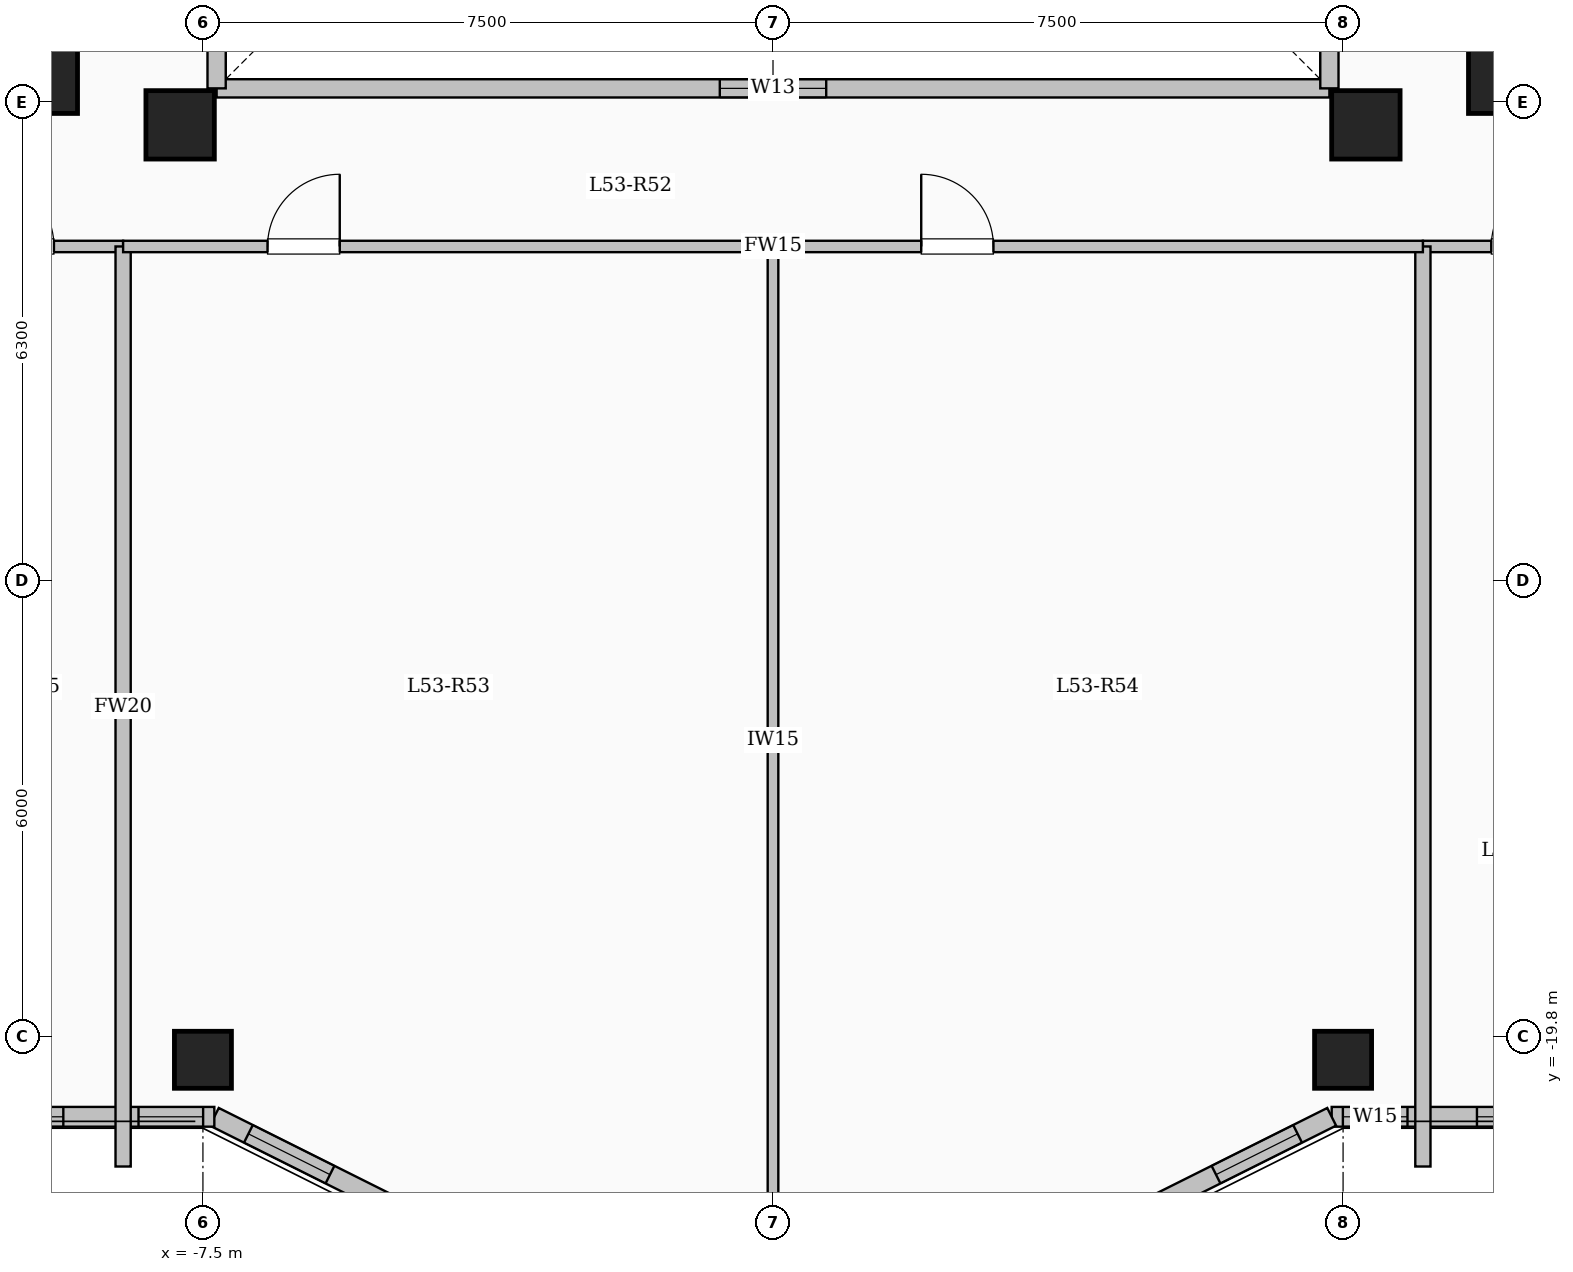
"""IFC4 building model, lengths in metres.
Left out: names, types, materials, properties, quantities, classifications, styles, units other than length and angle.
Written with IfcOpenShell. Run it as: python <this file> out.ifc"""

import sys

from ifc_helpers import new_model, si_unit, direction, frame, frame_2d, origin, origin_2d, place, context, subcontext, project, spatial, rectangle, extrude, element, fill, save


model = new_model("IFC4")
c1 = context("Model", 3, precision=1e-05, world=origin(), true_north=direction((0.0, 1.0)))
c2 = subcontext(c1, "Body", "Model", "MODEL_VIEW")
j1 = project(units=[si_unit("LENGTHUNIT", "METRE"), si_unit("PLANEANGLEUNIT", "RADIAN")], contexts=[c1])
p1 = place(None, origin())
s1 = spatial("IfcSite", under=j1, at=p1, CompositionType="ELEMENT")
p2 = place(p1, origin())
s2 = spatial("IfcBuilding", under=s1, at=p2, CompositionType="ELEMENT")
p3 = place(p2, frame((0.0, 0.0, 196.95)))
s3 = spatial("IfcBuildingStorey", under=s2, at=p3, CompositionType="ELEMENT", Elevation=196.95)
for number, where, z_axis, x_axis in (
    (1, (-7.8, -7.8, 0.0), (0.0, 0.0, 1.0), (1.0, 0.0, 0.0)),
    (2, (7.8, -7.8, 0.0), (0.0, 0.0, 1.0), (1.0, 0.0, 0.0)),
    (3, (-9.6, -7.2, 0.0), (0.0, 0.0, 1.0), (1.0, 0.0, 0.0)),
    (4, (9.6, -7.2, 0.0), (0.0, 0.0, 1.0), (1.0, 0.0, 0.0)),
):
    element("IfcColumn", number, at=place(p3, frame(where, z_axis=z_axis, x_axis=x_axis)), inside=s3, PredefinedType="COLUMN", context=c2, shape_type="SweptSolid", body=[
        extrude(rectangle(XDim=0.9, YDim=0.9, at=origin_2d()), origin(), (0.0, 0.0, 1.0), 3.35),
    ])
for number, where, z_axis, x_axis in (
    (5, (-7.5, -20.1, 0.0), (0.0, 0.0, 1.0), (1.0, 0.0, 0.0)),
    (6, (7.5, -20.1, 0.0), (0.0, 0.0, 1.0), (1.0, 0.0, 0.0)),
):
    element("IfcColumn", number, at=place(p3, frame(where, z_axis=z_axis, x_axis=x_axis)), inside=s3, PredefinedType="COLUMN", context=c2, shape_type="SweptSolid", body=[
        extrude(rectangle(XDim=0.75, YDim=0.75, at=origin_2d()), origin(), (0.0, 0.0, 1.0), 3.35),
    ])
p4 = place(p3, frame((-7.32, -7.32, 0.0), z_axis=(0.0, 0.0, 1.0), x_axis=(1.0, 0.0, 0.0)))
e7 = element("IfcWall", 7, at=p4, inside=s3, PredefinedType="SOLIDWALL", context=c2, shape_type="SweptSolid", body=[
    extrude(rectangle(XDim=14.64, YDim=0.24, at=frame_2d((7.32, 0.0))), origin(), (0.0, 0.0, 1.0), 3.1),
])
p5 = place(p4, frame((6.62, 0.0, 0.95)))
e8 = element("IfcOpeningElement", 8, at=p5, cuts=e7, PredefinedType="OPENING", context=c2, shape_type="SweptSolid", body=[
    extrude(rectangle(XDim=1.4, YDim=1.5, at=frame_2d((0.7, 0.75))), frame((0.0, 0.13, 0.0), z_axis=(0.0, -1.0, 0.0), x_axis=(1.0, 0.0, 0.0)), (0.0, 0.0, 1.0), 0.26),
])
p6 = place(p3, frame((7.32, -7.32, 0.0), z_axis=(0.0, 0.0, 1.0), x_axis=(0.0, 1.0, 0.0)))
e9 = element("IfcWall", 9, at=p6, inside=s3, PredefinedType="SOLIDWALL", context=c2, shape_type="SweptSolid", body=[
    extrude(rectangle(XDim=14.64, YDim=0.24, at=frame_2d((7.32, 0.0))), origin(), (0.0, 0.0, 1.0), 3.1),
])
p7 = place(p6, frame((6.62, 0.0, 0.95)))
e10 = element("IfcOpeningElement", 10, at=p7, cuts=e9, PredefinedType="OPENING", context=c2, shape_type="SweptSolid", body=[
    extrude(rectangle(XDim=1.4, YDim=1.5, at=frame_2d((0.7, 0.75))), frame((0.0, 0.13, 0.0), z_axis=(0.0, -1.0, 0.0), x_axis=(1.0, 0.0, 0.0)), (0.0, 0.0, 1.0), 0.26),
])
p8 = place(p3, frame((-7.32, 7.32, 0.0), z_axis=(0.0, 0.0, 1.0), x_axis=(0.0, -1.0, 0.0)))
e11 = element("IfcWall", 11, at=p8, inside=s3, PredefinedType="SOLIDWALL", context=c2, shape_type="SweptSolid", body=[
    extrude(rectangle(XDim=14.64, YDim=0.24, at=frame_2d((7.32, 0.0))), origin(), (0.0, 0.0, 1.0), 3.1),
])
p9 = place(p8, frame((6.62, 0.0, 0.95)))
e12 = element("IfcOpeningElement", 12, at=p9, cuts=e11, PredefinedType="OPENING", context=c2, shape_type="SweptSolid", body=[
    extrude(rectangle(XDim=1.4, YDim=1.5, at=frame_2d((0.7, 0.75))), frame((0.0, 0.13, 0.0), z_axis=(0.0, -1.0, 0.0), x_axis=(1.0, 0.0, 0.0)), (0.0, 0.0, 1.0), 0.26),
])
p10 = place(p3, frame((18.45, -20.85, 0.0), z_axis=(0.0, 0.0, 1.0), x_axis=(-1.0, 0.0, 0.0)))
e13 = element("IfcWall", 13, at=p10, inside=s3, PredefinedType="SOLIDWALL", context=c2, shape_type="SweptSolid", body=[
    extrude(rectangle(XDim=11.1, YDim=0.26, at=frame_2d((5.55, 0.0))), origin(), (0.0, 0.0, 1.0), 3.1),
])
p11 = place(p10, frame((0.656, 0.0, 0.95)))
e14 = element("IfcOpeningElement", 14, at=p11, cuts=e13, PredefinedType="OPENING", context=c2, shape_type="SweptSolid", body=[
    extrude(rectangle(XDim=1.2, YDim=1.5, at=frame_2d((0.6, 0.75))), frame((0.0, 0.14, 0.0), z_axis=(0.0, -1.0, 0.0), x_axis=(1.0, 0.0, 0.0)), (0.0, 0.0, 1.0), 0.28),
])
p12 = place(p10, frame((3.117, 0.0, 0.95)))
e15 = element("IfcOpeningElement", 15, at=p12, cuts=e13, PredefinedType="OPENING", context=c2, shape_type="SweptSolid", body=[
    extrude(rectangle(XDim=1.2, YDim=1.5, at=frame_2d((0.6, 0.75))), frame((0.0, 0.14, 0.0), z_axis=(0.0, -1.0, 0.0), x_axis=(1.0, 0.0, 0.0)), (0.0, 0.0, 1.0), 0.28),
])
p13 = place(p10, frame((5.566, 0.0, 0.95)))
e16 = element("IfcOpeningElement", 16, at=p13, cuts=e13, PredefinedType="OPENING", context=c2, shape_type="SweptSolid", body=[
    extrude(rectangle(XDim=1.2, YDim=1.5, at=frame_2d((0.6, 0.75))), frame((0.0, 0.14, 0.0), z_axis=(0.0, -1.0, 0.0), x_axis=(1.0, 0.0, 0.0)), (0.0, 0.0, 1.0), 0.28),
])
p14 = place(p10, frame((7.989, 0.0, 0.95)))
e17 = element("IfcOpeningElement", 17, at=p14, cuts=e13, PredefinedType="OPENING", context=c2, shape_type="SweptSolid", body=[
    extrude(rectangle(XDim=1.2, YDim=1.5, at=frame_2d((0.6, 0.75))), frame((0.0, 0.14, 0.0), z_axis=(0.0, -1.0, 0.0), x_axis=(1.0, 0.0, 0.0)), (0.0, 0.0, 1.0), 0.28),
])
p15 = place(p10, frame((10.103, 0.0, 0.95)))
e18 = element("IfcOpeningElement", 18, at=p15, cuts=e13, PredefinedType="OPENING", context=c2, shape_type="SweptSolid", body=[
    extrude(rectangle(XDim=0.85, YDim=1.5, at=frame_2d((0.425, 0.75))), frame((0.0, 0.14, 0.0), z_axis=(0.0, -1.0, 0.0), x_axis=(1.0, 0.0, 0.0)), (0.0, 0.0, 1.0), 0.28),
])
p16 = place(p3, frame((7.35, -20.85, 0.0), z_axis=(0.0, 0.0, 1.0), x_axis=(-0.894427191, -0.4472135955, 0.0)))
e19 = element("IfcWall", 19, at=p16, inside=s3, PredefinedType="SOLIDWALL", context=c2, shape_type="SweptSolid", body=[
    extrude(rectangle(XDim=3.354, YDim=0.26, at=frame_2d((1.677, 0.0))), origin(), (0.0, 0.0, 1.0), 3.1),
])
p17 = place(p16, frame((0.501, 0.0, 0.95)))
e20 = element("IfcOpeningElement", 20, at=p17, cuts=e19, PredefinedType="OPENING", context=c2, shape_type="SweptSolid", body=[
    extrude(rectangle(XDim=1.2, YDim=1.5, at=frame_2d((0.6, 0.75))), frame((0.0, 0.14, 0.0), z_axis=(0.0, -1.0, 0.0), x_axis=(1.0, 0.0, 0.0)), (0.0, 0.0, 1.0), 0.28),
])
p18 = place(p3, frame((-4.35, -22.35, 0.0), z_axis=(0.0, 0.0, 1.0), x_axis=(-0.894427191, 0.4472135955, 0.0)))
e21 = element("IfcWall", 21, at=p18, inside=s3, PredefinedType="SOLIDWALL", context=c2, shape_type="SweptSolid", body=[
    extrude(rectangle(XDim=3.354, YDim=0.26, at=frame_2d((1.677, 0.0))), origin(), (0.0, 0.0, 1.0), 3.1),
])
p19 = place(p18, frame((1.653, 0.0, 0.95)))
e22 = element("IfcOpeningElement", 22, at=p19, cuts=e21, PredefinedType="OPENING", context=c2, shape_type="SweptSolid", body=[
    extrude(rectangle(XDim=1.2, YDim=1.5, at=frame_2d((0.6, 0.75))), frame((0.0, 0.14, 0.0), z_axis=(0.0, -1.0, 0.0), x_axis=(1.0, 0.0, 0.0)), (0.0, 0.0, 1.0), 0.28),
])
p20 = place(p3, frame((-7.35, -20.85, 0.0), z_axis=(0.0, 0.0, 1.0), x_axis=(-1.0, 0.0, 0.0)))
e23 = element("IfcWall", 23, at=p20, inside=s3, PredefinedType="SOLIDWALL", context=c2, shape_type="SweptSolid", body=[
    extrude(rectangle(XDim=11.1, YDim=0.26, at=frame_2d((5.55, 0.0))), origin(), (0.0, 0.0, 1.0), 3.1),
])
p21 = place(p20, frame((0.147, 0.0, 0.95)))
e24 = element("IfcOpeningElement", 24, at=p21, cuts=e23, PredefinedType="OPENING", context=c2, shape_type="SweptSolid", body=[
    extrude(rectangle(XDim=0.85, YDim=1.5, at=frame_2d((0.425, 0.75))), frame((0.0, 0.14, 0.0), z_axis=(0.0, -1.0, 0.0), x_axis=(1.0, 0.0, 0.0)), (0.0, 0.0, 1.0), 0.28),
])
p22 = place(p20, frame((1.987, 0.0, 0.95)))
e25 = element("IfcOpeningElement", 25, at=p22, cuts=e23, PredefinedType="OPENING", context=c2, shape_type="SweptSolid", body=[
    extrude(rectangle(XDim=1.2, YDim=1.5, at=frame_2d((0.6, 0.75))), frame((0.0, 0.14, 0.0), z_axis=(0.0, -1.0, 0.0), x_axis=(1.0, 0.0, 0.0)), (0.0, 0.0, 1.0), 0.28),
])
p23 = place(p20, frame((4.926, 0.0, 0.9)))
e26 = element("IfcOpeningElement", 26, at=p23, cuts=e23, PredefinedType="OPENING", context=c2, shape_type="SweptSolid", body=[
    extrude(rectangle(XDim=1.65, YDim=1.6, at=frame_2d((0.825, 0.8))), frame((0.0, 0.14, 0.0), z_axis=(0.0, -1.0, 0.0), x_axis=(1.0, 0.0, 0.0)), (0.0, 0.0, 1.0), 0.28),
])
p24 = place(p20, frame((8.467, 0.0, 0.9)))
e27 = element("IfcOpeningElement", 27, at=p24, cuts=e23, PredefinedType="OPENING", context=c2, shape_type="SweptSolid", body=[
    extrude(rectangle(XDim=1.65, YDim=1.6, at=frame_2d((0.825, 0.8))), frame((0.0, 0.14, 0.0), z_axis=(0.0, -1.0, 0.0), x_axis=(1.0, 0.0, 0.0)), (0.0, 0.0, 1.0), 0.28),
])
p25 = place(p3, frame((-18.35, -9.4, 0.0), z_axis=(0.0, 0.0, 1.0), x_axis=(1.0, 0.0, 0.0)))
e28 = element("IfcWall", 28, at=p25, inside=s3, PredefinedType="PARTITIONING", context=c2, shape_type="SweptSolid", body=[
    extrude(rectangle(XDim=9.8, YDim=0.15, at=frame_2d((4.9, 0.0))), origin(), (0.0, 0.0, 1.0), 3.1),
])
p26 = place(p25, frame((1.25, 0.0, 0.0)))
e29 = element("IfcOpeningElement", 29, at=p26, cuts=e28, PredefinedType="OPENING", context=c2, shape_type="SweptSolid", body=[
    extrude(rectangle(XDim=0.95, YDim=2.15, at=frame_2d((0.475, 1.075))), frame((0.0, 0.085, 0.0), z_axis=(0.0, -1.0, 0.0), x_axis=(1.0, 0.0, 0.0)), (0.0, 0.0, 1.0), 0.17),
])
p27 = place(p25, frame((4.79, 0.0, 0.0)))
e30 = element("IfcOpeningElement", 30, at=p27, cuts=e28, PredefinedType="OPENING", context=c2, shape_type="SweptSolid", body=[
    extrude(rectangle(XDim=0.95, YDim=2.15, at=frame_2d((0.475, 1.075))), frame((0.0, 0.085, 0.0), z_axis=(0.0, -1.0, 0.0), x_axis=(1.0, 0.0, 0.0)), (0.0, 0.0, 1.0), 0.17),
])
p28 = place(p25, frame((7.94, 0.0, 0.0)))
e31 = element("IfcOpeningElement", 31, at=p28, cuts=e28, PredefinedType="OPENING", context=c2, shape_type="SweptSolid", body=[
    extrude(rectangle(XDim=0.95, YDim=2.15, at=frame_2d((0.475, 1.075))), frame((0.0, 0.085, 0.0), z_axis=(0.0, -1.0, 0.0), x_axis=(1.0, 0.0, 0.0)), (0.0, 0.0, 1.0), 0.17),
])
p29 = place(p3, frame((8.55, -9.4, 0.0), z_axis=(0.0, 0.0, 1.0), x_axis=(1.0, 0.0, 0.0)))
e32 = element("IfcWall", 32, at=p29, inside=s3, PredefinedType="PARTITIONING", context=c2, shape_type="SweptSolid", body=[
    extrude(rectangle(XDim=9.8, YDim=0.15, at=frame_2d((4.9, 0.0))), origin(), (0.0, 0.0, 1.0), 3.1),
])
p30 = place(p29, frame((0.9, 0.0, 0.0)))
e33 = element("IfcOpeningElement", 33, at=p30, cuts=e32, PredefinedType="OPENING", context=c2, shape_type="SweptSolid", body=[
    extrude(rectangle(XDim=0.96, YDim=2.15, at=frame_2d((0.48, 1.075))), frame((0.0, 0.085, 0.0), z_axis=(0.0, -1.0, 0.0), x_axis=(1.0, 0.0, 0.0)), (0.0, 0.0, 1.0), 0.17),
])
p31 = place(p29, frame((5.625, 0.0, 0.0)))
e34 = element("IfcOpeningElement", 34, at=p31, cuts=e32, PredefinedType="OPENING", context=c2, shape_type="SweptSolid", body=[
    extrude(rectangle(XDim=0.96, YDim=2.15, at=frame_2d((0.48, 1.075))), frame((0.0, 0.085, 0.0), z_axis=(0.0, -1.0, 0.0), x_axis=(1.0, 0.0, 0.0)), (0.0, 0.0, 1.0), 0.17),
])
for number, where, z_axis, x_axis in (
    (35, (-8.55, -21.504, 0.0), (0.0, 0.0, 1.0), (0.0, 1.0, 0.0)),
    (36, (8.55, -21.504, 0.0), (0.0, 0.0, 1.0), (0.0, 1.0, 0.0)),
):
    element("IfcWall", number, at=place(p3, frame(where, z_axis=z_axis, x_axis=x_axis)), inside=s3, PredefinedType="SOLIDWALL", context=c2, shape_type="SweptSolid", body=[
        extrude(rectangle(XDim=12.104, YDim=0.2, at=frame_2d((6.052, 0.0))), origin(), (0.0, 0.0, 1.0), 3.1),
    ])
p32 = place(p3, frame((-8.55, -9.4, 0.0), z_axis=(0.0, 0.0, 1.0), x_axis=(1.0, 0.0, 0.0)))
e37 = element("IfcWall", 37, at=p32, inside=s3, PredefinedType="PARTITIONING", context=c2, shape_type="SweptSolid", body=[
    extrude(rectangle(XDim=17.1, YDim=0.15, at=frame_2d((8.55, 0.0))), origin(), (0.0, 0.0, 1.0), 3.1),
])
p33 = place(p32, frame((1.9, 0.0, 0.0)))
e38 = element("IfcOpeningElement", 38, at=p33, cuts=e37, PredefinedType="OPENING", context=c2, shape_type="SweptSolid", body=[
    extrude(rectangle(XDim=0.95, YDim=2.15, at=frame_2d((0.475, 1.075))), frame((0.0, 0.085, 0.0), z_axis=(0.0, -1.0, 0.0), x_axis=(1.0, 0.0, 0.0)), (0.0, 0.0, 1.0), 0.17),
])
p34 = place(p32, frame((10.5, 0.0, 0.0)))
e39 = element("IfcOpeningElement", 39, at=p34, cuts=e37, PredefinedType="OPENING", context=c2, shape_type="SweptSolid", body=[
    extrude(rectangle(XDim=0.95, YDim=2.15, at=frame_2d((0.475, 1.075))), frame((0.0, 0.085, 0.0), z_axis=(0.0, -1.0, 0.0), x_axis=(1.0, 0.0, 0.0)), (0.0, 0.0, 1.0), 0.17),
])
p35 = place(p3, frame((0.0, -22.38, 0.0), z_axis=(0.0, 0.0, 1.0), x_axis=(0.0, 1.0, 0.0)))
e40 = element("IfcWall", 40, at=p35, inside=s3, PredefinedType="PARTITIONING", context=c2, shape_type="SweptSolid", body=[
    extrude(rectangle(XDim=12.98, YDim=0.14, at=frame_2d((6.49, 0.0))), origin(), (0.0, 0.0, 1.0), 3.1),
])
p36 = place(p5, origin())
e41 = element("IfcWindow", 41, at=p36, inside=s3, PartitioningType="SINGLE_PANEL", PredefinedType="WINDOW", context=c2, shape_type="SweptSolid", body=[
    extrude(rectangle(XDim=1.4, YDim=1.5, at=frame_2d((0.7, 0.75))), frame((0.0, 0.03, 0.0), z_axis=(0.0, -1.0, 0.0), x_axis=(1.0, 0.0, 0.0)), (0.0, 0.0, 1.0), 0.06),
])
fill(e8, e41)
p37 = place(p14, origin())
e42 = element("IfcWindow", 42, at=p37, inside=s3, PartitioningType="SINGLE_PANEL", PredefinedType="WINDOW", context=c2, shape_type="SweptSolid", body=[
    extrude(rectangle(XDim=1.2, YDim=1.5, at=frame_2d((0.6, 0.75))), frame((0.0, 0.03, 0.0), z_axis=(0.0, -1.0, 0.0), x_axis=(1.0, 0.0, 0.0)), (0.0, 0.0, 1.0), 0.06),
])
fill(e17, e42)
p38 = place(p15, origin())
e43 = element("IfcWindow", 43, at=p38, inside=s3, PartitioningType="SINGLE_PANEL", PredefinedType="WINDOW", context=c2, shape_type="SweptSolid", body=[
    extrude(rectangle(XDim=0.85, YDim=1.5, at=frame_2d((0.425, 0.75))), frame((0.0, 0.03, 0.0), z_axis=(0.0, -1.0, 0.0), x_axis=(1.0, 0.0, 0.0)), (0.0, 0.0, 1.0), 0.06),
])
fill(e18, e43)
p39 = place(p17, origin())
e44 = element("IfcWindow", 44, at=p39, inside=s3, PartitioningType="SINGLE_PANEL", PredefinedType="WINDOW", context=c2, shape_type="SweptSolid", body=[
    extrude(rectangle(XDim=1.2, YDim=1.5, at=frame_2d((0.6, 0.75))), frame((0.0, 0.03, 0.0), z_axis=(0.0, -1.0, 0.0), x_axis=(1.0, 0.0, 0.0)), (0.0, 0.0, 1.0), 0.06),
])
fill(e20, e44)
p40 = place(p19, origin())
e45 = element("IfcWindow", 45, at=p40, inside=s3, PartitioningType="SINGLE_PANEL", PredefinedType="WINDOW", context=c2, shape_type="SweptSolid", body=[
    extrude(rectangle(XDim=1.2, YDim=1.5, at=frame_2d((0.6, 0.75))), frame((0.0, 0.03, 0.0), z_axis=(0.0, -1.0, 0.0), x_axis=(1.0, 0.0, 0.0)), (0.0, 0.0, 1.0), 0.06),
])
fill(e22, e45)
p41 = place(p21, origin())
e46 = element("IfcWindow", 46, at=p41, inside=s3, PartitioningType="SINGLE_PANEL", PredefinedType="WINDOW", context=c2, shape_type="SweptSolid", body=[
    extrude(rectangle(XDim=0.85, YDim=1.5, at=frame_2d((0.425, 0.75))), frame((0.0, 0.03, 0.0), z_axis=(0.0, -1.0, 0.0), x_axis=(1.0, 0.0, 0.0)), (0.0, 0.0, 1.0), 0.06),
])
fill(e24, e46)
p42 = place(p22, origin())
e47 = element("IfcWindow", 47, at=p42, inside=s3, PartitioningType="SINGLE_PANEL", PredefinedType="WINDOW", context=c2, shape_type="SweptSolid", body=[
    extrude(rectangle(XDim=1.2, YDim=1.5, at=frame_2d((0.6, 0.75))), frame((0.0, 0.03, 0.0), z_axis=(0.0, -1.0, 0.0), x_axis=(1.0, 0.0, 0.0)), (0.0, 0.0, 1.0), 0.06),
])
fill(e25, e47)
p43 = place(p28, origin())
e48 = element("IfcDoor", 48, at=p43, inside=s3, OperationType="SINGLE_SWING_LEFT", PredefinedType="DOOR", context=c2, shape_type="SweptSolid", body=[
    extrude(rectangle(XDim=0.95, YDim=2.15, at=frame_2d((0.475, 1.075))), frame((0.0, 0.025, 0.0), z_axis=(0.0, -1.0, 0.0), x_axis=(1.0, 0.0, 0.0)), (0.0, 0.0, 1.0), 0.05),
])
fill(e31, e48)
p44 = place(p30, origin())
e49 = element("IfcDoor", 49, at=p44, inside=s3, OperationType="SINGLE_SWING_RIGHT", PredefinedType="DOOR", context=c2, shape_type="SweptSolid", body=[
    extrude(rectangle(XDim=0.96, YDim=2.15, at=frame_2d((0.48, 1.075))), frame((0.0, 0.025, 0.0), z_axis=(0.0, -1.0, 0.0), x_axis=(1.0, 0.0, 0.0)), (0.0, 0.0, 1.0), 0.05),
])
fill(e33, e49)
p45 = place(p33, origin())
e50 = element("IfcDoor", 50, at=p45, inside=s3, OperationType="SINGLE_SWING_RIGHT", PredefinedType="DOOR", context=c2, shape_type="SweptSolid", body=[
    extrude(rectangle(XDim=0.95, YDim=2.15, at=frame_2d((0.475, 1.075))), frame((0.0, 0.025, 0.0), z_axis=(0.0, -1.0, 0.0), x_axis=(1.0, 0.0, 0.0)), (0.0, 0.0, 1.0), 0.05),
])
fill(e38, e50)
p46 = place(p34, origin())
e51 = element("IfcDoor", 51, at=p46, inside=s3, OperationType="SINGLE_SWING_LEFT", PredefinedType="DOOR", context=c2, shape_type="SweptSolid", body=[
    extrude(rectangle(XDim=0.95, YDim=2.15, at=frame_2d((0.475, 1.075))), frame((0.0, 0.025, 0.0), z_axis=(0.0, -1.0, 0.0), x_axis=(1.0, 0.0, 0.0)), (0.0, 0.0, 1.0), 0.05),
])
fill(e39, e51)
save(model, sys.argv[1])
